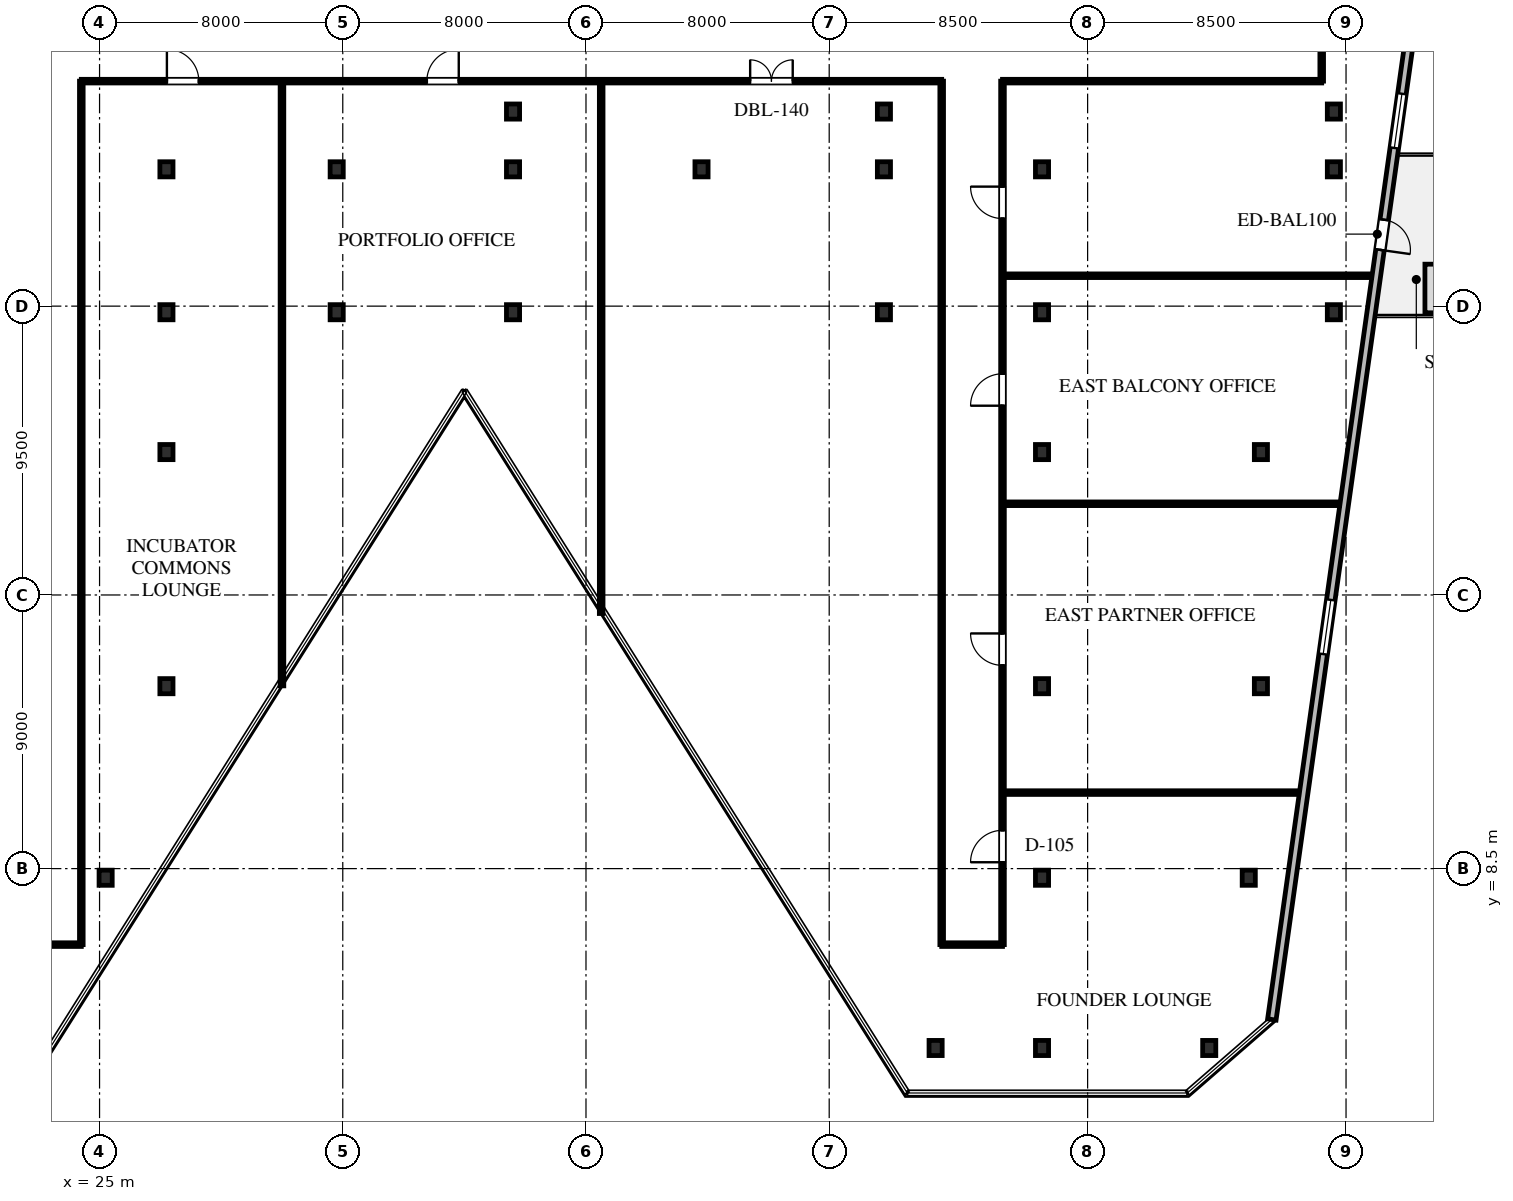
"""IFC4 building model, lengths in metres.
Left out: names, types, materials, properties, quantities, classifications, styles, units other than length and angle.
Written with IfcOpenShell. Run it as: python <this file> out.ifc"""

import sys

from ifc_helpers import new_model, si_unit, direction, frame, frame_2d, origin, origin_2d, place, context, subcontext, project, spatial, rectangle, i_section, extrude, element, fill, save


model = new_model("IFC4")
c1 = context("Model", 3, precision=1e-05, world=origin(), true_north=direction((0.0, 1.0)))
c2 = subcontext(c1, "Body", "Model", "MODEL_VIEW")
j1 = project(units=[si_unit("LENGTHUNIT", "METRE"), si_unit("PLANEANGLEUNIT", "RADIAN")], contexts=[c1])
p1 = place(None, origin())
s1 = spatial("IfcSite", under=j1, at=p1, CompositionType="ELEMENT")
p2 = place(p1, origin())
s2 = spatial("IfcBuilding", under=s1, at=p2, CompositionType="ELEMENT")
p3 = place(p2, frame((0.0, 0.0, 77.5)))
s3 = spatial("IfcBuildingStorey", under=s2, at=p3, CompositionType="ELEMENT", Elevation=77.5)
for number, where, z_axis, x_axis in (
    (1, (56.0, 14.5, 0.0), (0.0, 0.0, 1.0), (1.0, 0.0, 0.0)),
    (2, (63.2, 14.5, 0.0), (0.0, 0.0, 1.0), (1.0, 0.0, 0.0)),
    (3, (27.2, 22.2, 0.0), (0.0, 0.0, 1.0), (1.0, 0.0, 0.0)),
    (4, (56.0, 22.2, 0.0), (0.0, 0.0, 1.0), (1.0, 0.0, 0.0)),
    (5, (63.2, 22.2, 0.0), (0.0, 0.0, 1.0), (1.0, 0.0, 0.0)),
    (6, (27.2, 26.8, 0.0), (0.0, 0.0, 1.0), (1.0, 0.0, 0.0)),
    (7, (32.8, 26.8, 0.0), (0.0, 0.0, 1.0), (1.0, 0.0, 0.0)),
    (8, (38.6, 26.8, 0.0), (0.0, 0.0, 1.0), (1.0, 0.0, 0.0)),
    (9, (50.8, 26.8, 0.0), (0.0, 0.0, 1.0), (1.0, 0.0, 0.0)),
    (10, (56.0, 26.8, 0.0), (0.0, 0.0, 1.0), (1.0, 0.0, 0.0)),
    (11, (65.6, 26.8, 0.0), (0.0, 0.0, 1.0), (1.0, 0.0, 0.0)),
    (12, (27.2, 31.5, 0.0), (0.0, 0.0, 1.0), (1.0, 0.0, 0.0)),
    (13, (32.8, 31.5, 0.0), (0.0, 0.0, 1.0), (1.0, 0.0, 0.0)),
    (14, (38.6, 31.5, 0.0), (0.0, 0.0, 1.0), (1.0, 0.0, 0.0)),
    (15, (44.8, 31.5, 0.0), (0.0, 0.0, 1.0), (1.0, 0.0, 0.0)),
    (16, (50.8, 31.5, 0.0), (0.0, 0.0, 1.0), (1.0, 0.0, 0.0)),
    (17, (56.0, 31.5, 0.0), (0.0, 0.0, 1.0), (1.0, 0.0, 0.0)),
    (18, (65.6, 31.5, 0.0), (0.0, 0.0, 1.0), (1.0, 0.0, 0.0)),
    (19, (52.5, 2.6, 0.0), (0.0, 0.0, 1.0), (1.0, 0.0, 0.0)),
    (20, (56.0, 2.6, 0.0), (0.0, 0.0, 1.0), (1.0, 0.0, 0.0)),
    (21, (61.5, 2.6, 0.0), (0.0, 0.0, 1.0), (1.0, 0.0, 0.0)),
    (22, (25.2, 8.2, 0.0), (0.0, 0.0, 1.0), (1.0, 0.0, 0.0)),
    (23, (56.0, 8.2, 0.0), (0.0, 0.0, 1.0), (1.0, 0.0, 0.0)),
    (24, (62.8, 8.2, 0.0), (0.0, 0.0, 1.0), (1.0, 0.0, 0.0)),
    (25, (27.2, 14.5, 0.0), (0.0, 0.0, 1.0), (1.0, 0.0, 0.0)),
    (26, (38.6, 33.4, 0.0), (0.0, 0.0, 1.0), (1.0, 0.0, 0.0)),
    (27, (50.8, 33.4, 0.0), (0.0, 0.0, 1.0), (1.0, 0.0, 0.0)),
    (28, (65.6, 33.4, 0.0), (0.0, 0.0, 1.0), (1.0, 0.0, 0.0)),
):
    element("IfcColumn", number, at=place(p3, frame(where, z_axis=z_axis, x_axis=x_axis)), inside=s3, PredefinedType="COLUMN", context=c2, shape_type="SweptSolid", body=[
        extrude(i_section(OverallWidth=0.432, OverallDepth=0.498, WebThickness=0.056, FlangeThickness=0.089, FilletRadius=0.03, at=origin_2d()), origin(), (0.0, 0.0, 1.0), 4.0),
    ])
p4 = place(p3, frame((68.375, 37.8, 0.0), z_axis=(0.0, 0.0, 1.0), x_axis=(-0.139174610616, -0.990267856572, 0.0)))
e29 = element("IfcWall", 29, at=p4, inside=s3, PredefinedType="STANDARD", context=c2, shape_type="SweptSolid", body=[
    extrude(rectangle(XDim=34.6, YDim=0.28, at=frame_2d((17.3, 0.0))), origin(), (0.0, 0.0, 1.0), 3.74),
])
p5 = place(p4, frame((8.036, 0.0, 0.0)))
e30 = element("IfcOpeningElement", 30, at=p5, cuts=e29, PredefinedType="OPENING", context=c2, shape_type="SweptSolid", body=[
    extrude(rectangle(XDim=1.0, YDim=2.15, at=frame_2d((0.5, 1.075))), frame((0.0, 0.15, 0.0), z_axis=(0.0, -1.0, 0.0), x_axis=(1.0, 0.0, 0.0)), (0.0, 0.0, 1.0), 0.3),
])
p6 = place(p4, frame((3.852, 0.0, 0.65)))
e31 = element("IfcOpeningElement", 31, at=p6, cuts=e29, PredefinedType="OPENING", context=c2, shape_type="SweptSolid", body=[
    extrude(rectangle(XDim=1.8, YDim=2.1, at=frame_2d((0.9, 1.05))), frame((0.0, 0.15, 0.0), z_axis=(0.0, -1.0, 0.0), x_axis=(1.0, 0.0, 0.0)), (0.0, 0.0, 1.0), 0.3),
])
p7 = place(p4, frame((20.663, 0.0, 0.65)))
e32 = element("IfcOpeningElement", 32, at=p7, cuts=e29, PredefinedType="OPENING", context=c2, shape_type="SweptSolid", body=[
    extrude(rectangle(XDim=1.8, YDim=2.1, at=frame_2d((0.9, 1.05))), frame((0.0, 0.15, 0.0), z_axis=(0.0, -1.0, 0.0), x_axis=(1.0, 0.0, 0.0)), (0.0, 0.0, 1.0), 0.3),
])
p8 = place(p3, frame((24.4, 34.4, 0.0), z_axis=(0.0, 0.0, 1.0), x_axis=(1.0, 0.0, 0.0)))
e33 = element("IfcWall", 33, at=p8, inside=s3, PredefinedType="PARTITIONING", context=c2, shape_type="SweptSolid", body=[
    extrude(rectangle(XDim=28.3, YDim=0.12, at=frame_2d((14.15, 0.0))), origin(), (0.0, 0.0, 1.0), 2.813),
])
p9 = place(p8, frame((2.815, 0.0, 0.0)))
e34 = element("IfcOpeningElement", 34, at=p9, cuts=e33, PredefinedType="OPENING", context=c2, shape_type="SweptSolid", body=[
    extrude(rectangle(XDim=1.05, YDim=2.2, at=frame_2d((0.525, 1.1))), frame((0.0, 0.07, 0.0), z_axis=(0.0, -1.0, 0.0), x_axis=(1.0, 0.0, 0.0)), (0.0, 0.0, 1.0), 0.14),
])
p10 = place(p8, frame((11.365, 0.0, 0.0)))
e35 = element("IfcOpeningElement", 35, at=p10, cuts=e33, PredefinedType="OPENING", context=c2, shape_type="SweptSolid", body=[
    extrude(rectangle(XDim=1.05, YDim=2.2, at=frame_2d((0.525, 1.1))), frame((0.0, 0.07, 0.0), z_axis=(0.0, -1.0, 0.0), x_axis=(1.0, 0.0, 0.0)), (0.0, 0.0, 1.0), 0.14),
])
p11 = place(p8, frame((22.0, 0.0, 0.0)))
e36 = element("IfcOpeningElement", 36, at=p11, cuts=e33, PredefinedType="OPENING", context=c2, shape_type="SweptSolid", body=[
    extrude(rectangle(XDim=1.4, YDim=2.2, at=frame_2d((0.7, 1.1))), frame((0.0, 0.07, 0.0), z_axis=(0.0, -1.0, 0.0), x_axis=(1.0, 0.0, 0.0)), (0.0, 0.0, 1.0), 0.14),
])
p12 = place(p3, frame((54.7, 34.4, 0.0), z_axis=(0.0, 0.0, 1.0), x_axis=(1.0, 0.0, 0.0)))
e37 = element("IfcWall", 37, at=p12, inside=s3, PredefinedType="PARTITIONING", context=c2, shape_type="SweptSolid", body=[
    extrude(rectangle(XDim=10.5, YDim=0.12, at=frame_2d((5.25, 0.0))), origin(), (0.0, 0.0, 1.0), 2.813),
])
p13 = place(p3, frame((65.2, 34.4, 0.0), z_axis=(0.0, 0.0, 1.0), x_axis=(0.0, 1.0, 0.0)))
e38 = element("IfcWall", 38, at=p13, inside=s3, PredefinedType="PARTITIONING", context=c2, shape_type="SweptSolid", body=[
    extrude(rectangle(XDim=3.217, YDim=0.12, at=frame_2d((1.608, 0.0))), origin(), (0.0, 0.0, 1.0), 2.813),
])
p14 = place(p3, frame((24.4, 6.0, 0.0), z_axis=(0.0, 0.0, 1.0), x_axis=(0.0, 1.0, 0.0)))
e39 = element("IfcWall", 39, at=p14, inside=s3, PredefinedType="PARTITIONING", context=c2, shape_type="SweptSolid", body=[
    extrude(rectangle(XDim=28.4, YDim=0.12, at=frame_2d((14.2, 0.0))), origin(), (0.0, 0.0, 1.0), 2.813),
])
p15 = place(p3, frame((22.4, 6.0, 0.0), z_axis=(0.0, 0.0, 1.0), x_axis=(1.0, 0.0, 0.0)))
e40 = element("IfcWall", 40, at=p15, inside=s3, PredefinedType="PARTITIONING", context=c2, shape_type="SweptSolid", body=[
    extrude(rectangle(XDim=2.0, YDim=0.12, at=frame_2d((1.0, 0.0))), origin(), (0.0, 0.0, 1.0), 2.978),
])
p16 = place(p3, frame((52.7, 6.0, 0.0), z_axis=(0.0, 0.0, 1.0), x_axis=(0.0, 1.0, 0.0)))
e41 = element("IfcWall", 41, at=p16, inside=s3, PredefinedType="PARTITIONING", context=c2, shape_type="SweptSolid", body=[
    extrude(rectangle(XDim=28.4, YDim=0.12, at=frame_2d((14.2, 0.0))), origin(), (0.0, 0.0, 1.0), 2.813),
])
p17 = place(p3, frame((54.7, 6.0, 0.0), z_axis=(0.0, 0.0, 1.0), x_axis=(0.0, 1.0, 0.0)))
e42 = element("IfcWall", 42, at=p17, inside=s3, PredefinedType="PARTITIONING", context=c2, shape_type="SweptSolid", body=[
    extrude(rectangle(XDim=28.4, YDim=0.12, at=frame_2d((14.2, 0.0))), origin(), (0.0, 0.0, 1.0), 2.813),
])
p18 = place(p17, frame((2.709, 0.0, 0.0)))
e43 = element("IfcOpeningElement", 43, at=p18, cuts=e42, PredefinedType="OPENING", context=c2, shape_type="SweptSolid", body=[
    extrude(rectangle(XDim=1.05, YDim=2.2, at=frame_2d((0.525, 1.1))), frame((0.0, 0.07, 0.0), z_axis=(0.0, -1.0, 0.0), x_axis=(1.0, 0.0, 0.0)), (0.0, 0.0, 1.0), 0.14),
])
p19 = place(p17, frame((9.185, 0.0, 0.0)))
e44 = element("IfcOpeningElement", 44, at=p19, cuts=e42, PredefinedType="OPENING", context=c2, shape_type="SweptSolid", body=[
    extrude(rectangle(XDim=1.05, YDim=2.2, at=frame_2d((0.525, 1.1))), frame((0.0, 0.07, 0.0), z_axis=(0.0, -1.0, 0.0), x_axis=(1.0, 0.0, 0.0)), (0.0, 0.0, 1.0), 0.14),
])
p20 = place(p17, frame((17.725, 0.0, 0.0)))
e45 = element("IfcOpeningElement", 45, at=p20, cuts=e42, PredefinedType="OPENING", context=c2, shape_type="SweptSolid", body=[
    extrude(rectangle(XDim=1.05, YDim=2.2, at=frame_2d((0.525, 1.1))), frame((0.0, 0.07, 0.0), z_axis=(0.0, -1.0, 0.0), x_axis=(1.0, 0.0, 0.0)), (0.0, 0.0, 1.0), 0.14),
])
p21 = place(p17, frame((23.881, 0.0, 0.0)))
e46 = element("IfcOpeningElement", 46, at=p21, cuts=e42, PredefinedType="OPENING", context=c2, shape_type="SweptSolid", body=[
    extrude(rectangle(XDim=1.05, YDim=2.2, at=frame_2d((0.525, 1.1))), frame((0.0, 0.07, 0.0), z_axis=(0.0, -1.0, 0.0), x_axis=(1.0, 0.0, 0.0)), (0.0, 0.0, 1.0), 0.14),
])
p22 = place(p3, frame((52.7, 6.0, 0.0), z_axis=(0.0, 0.0, 1.0), x_axis=(1.0, 0.0, 0.0)))
e47 = element("IfcWall", 47, at=p22, inside=s3, PredefinedType="PARTITIONING", context=c2, shape_type="SweptSolid", body=[
    extrude(rectangle(XDim=2.0, YDim=0.12, at=frame_2d((1.0, 0.0))), origin(), (0.0, 0.0, 1.0), 2.978),
])
p23 = place(p3, frame((54.768, 11.0, 0.0), z_axis=(0.0, 0.0, 1.0), x_axis=(1.0, 0.0, 0.0)))
e48 = element("IfcWall", 48, at=p23, inside=s3, PredefinedType="PARTITIONING", context=c2, shape_type="SweptSolid", body=[
    extrude(rectangle(XDim=9.674, YDim=0.12, at=frame_2d((4.837, 0.0))), origin(), (0.0, 0.0, 1.0), 2.813),
])
p24 = place(p3, frame((54.768, 20.5, 0.0), z_axis=(0.0, 0.0, 1.0), x_axis=(1.0, 0.0, 0.0)))
e49 = element("IfcWall", 49, at=p24, inside=s3, PredefinedType="PARTITIONING", context=c2, shape_type="SweptSolid", body=[
    extrude(rectangle(XDim=11.009, YDim=0.12, at=frame_2d((5.504, 0.0))), origin(), (0.0, 0.0, 1.0), 2.813),
])
p25 = place(p3, frame((54.768, 28.0, 0.0), z_axis=(0.0, 0.0, 1.0), x_axis=(1.0, 0.0, 0.0)))
e50 = element("IfcWall", 50, at=p25, inside=s3, PredefinedType="PARTITIONING", context=c2, shape_type="SweptSolid", body=[
    extrude(rectangle(XDim=12.063, YDim=0.12, at=frame_2d((6.031, 0.0))), origin(), (0.0, 0.0, 1.0), 2.813),
])
p26 = place(p3, frame((31.0, 14.511, 0.0), z_axis=(0.0, 0.0, 1.0), x_axis=(0.0, 1.0, 0.0)))
e51 = element("IfcWall", 51, at=p26, inside=s3, PredefinedType="PARTITIONING", context=c2, shape_type="SweptSolid", body=[
    extrude(rectangle(XDim=19.821, YDim=0.12, at=frame_2d((9.911, 0.0))), origin(), (0.0, 0.0, 1.0), 2.813),
])
p27 = place(p3, frame((41.5, 16.89, 0.0), z_axis=(0.0, 0.0, 1.0), x_axis=(0.0, 1.0, 0.0)))
e52 = element("IfcWall", 52, at=p27, inside=s3, PredefinedType="PARTITIONING", context=c2, shape_type="SweptSolid", body=[
    extrude(rectangle(XDim=17.442, YDim=0.12, at=frame_2d((8.721, 0.0))), origin(), (0.0, 0.0, 1.0), 2.813),
])
p28 = place(p5, origin())
e53 = element("IfcDoor", 53, at=p28, inside=s3, OperationType="SINGLE_SWING_RIGHT", PredefinedType="DOOR", context=c2, shape_type="SweptSolid", body=[
    extrude(rectangle(XDim=1.0, YDim=2.15, at=frame_2d((0.5, 1.075))), frame((0.0, 0.025, 0.0), z_axis=(0.0, -1.0, 0.0), x_axis=(1.0, 0.0, 0.0)), (0.0, 0.0, 1.0), 0.05),
])
fill(e30, e53)
p29 = place(p6, origin())
e54 = element("IfcWindow", 54, at=p29, inside=s3, PartitioningType="SINGLE_PANEL", PredefinedType="WINDOW", context=c2, shape_type="SweptSolid", body=[
    extrude(rectangle(XDim=1.8, YDim=2.1, at=frame_2d((0.9, 1.05))), frame((0.0, 0.03, 0.0), z_axis=(0.0, -1.0, 0.0), x_axis=(1.0, 0.0, 0.0)), (0.0, 0.0, 1.0), 0.06),
])
fill(e31, e54)
p30 = place(p7, origin())
e55 = element("IfcWindow", 55, at=p30, inside=s3, PartitioningType="SINGLE_PANEL", PredefinedType="WINDOW", context=c2, shape_type="SweptSolid", body=[
    extrude(rectangle(XDim=1.8, YDim=2.1, at=frame_2d((0.9, 1.05))), frame((0.0, 0.03, 0.0), z_axis=(0.0, -1.0, 0.0), x_axis=(1.0, 0.0, 0.0)), (0.0, 0.0, 1.0), 0.06),
])
fill(e32, e55)
p31 = place(p18, origin())
e56 = element("IfcDoor", 56, at=p31, inside=s3, OperationType="SINGLE_SWING_LEFT", PredefinedType="DOOR", context=c2, shape_type="SweptSolid", body=[
    extrude(rectangle(XDim=1.05, YDim=2.2, at=frame_2d((0.525, 1.1))), frame((0.0, 0.025, 0.0), z_axis=(0.0, -1.0, 0.0), x_axis=(1.0, 0.0, 0.0)), (0.0, 0.0, 1.0), 0.05),
])
fill(e43, e56)
p32 = place(p19, origin())
e57 = element("IfcDoor", 57, at=p32, inside=s3, OperationType="SINGLE_SWING_RIGHT", PredefinedType="DOOR", context=c2, shape_type="SweptSolid", body=[
    extrude(rectangle(XDim=1.05, YDim=2.2, at=frame_2d((0.525, 1.1))), frame((0.0, 0.025, 0.0), z_axis=(0.0, -1.0, 0.0), x_axis=(1.0, 0.0, 0.0)), (0.0, 0.0, 1.0), 0.05),
])
fill(e44, e57)
p33 = place(p20, origin())
e58 = element("IfcDoor", 58, at=p33, inside=s3, OperationType="SINGLE_SWING_LEFT", PredefinedType="DOOR", context=c2, shape_type="SweptSolid", body=[
    extrude(rectangle(XDim=1.05, YDim=2.2, at=frame_2d((0.525, 1.1))), frame((0.0, 0.025, 0.0), z_axis=(0.0, -1.0, 0.0), x_axis=(1.0, 0.0, 0.0)), (0.0, 0.0, 1.0), 0.05),
])
fill(e45, e58)
p34 = place(p21, origin())
e59 = element("IfcDoor", 59, at=p34, inside=s3, OperationType="SINGLE_SWING_RIGHT", PredefinedType="DOOR", context=c2, shape_type="SweptSolid", body=[
    extrude(rectangle(XDim=1.05, YDim=2.2, at=frame_2d((0.525, 1.1))), frame((0.0, 0.025, 0.0), z_axis=(0.0, -1.0, 0.0), x_axis=(1.0, 0.0, 0.0)), (0.0, 0.0, 1.0), 0.05),
])
fill(e46, e59)
p35 = place(p9, origin())
e60 = element("IfcDoor", 60, at=p35, inside=s3, OperationType="SINGLE_SWING_LEFT", PredefinedType="DOOR", context=c2, shape_type="SweptSolid", body=[
    extrude(rectangle(XDim=1.05, YDim=2.2, at=frame_2d((0.525, 1.1))), frame((0.0, 0.025, 0.0), z_axis=(0.0, -1.0, 0.0), x_axis=(1.0, 0.0, 0.0)), (0.0, 0.0, 1.0), 0.05),
])
fill(e34, e60)
p36 = place(p10, origin())
e61 = element("IfcDoor", 61, at=p36, inside=s3, OperationType="SINGLE_SWING_RIGHT", PredefinedType="DOOR", context=c2, shape_type="SweptSolid", body=[
    extrude(rectangle(XDim=1.05, YDim=2.2, at=frame_2d((0.525, 1.1))), frame((0.0, 0.025, 0.0), z_axis=(0.0, -1.0, 0.0), x_axis=(1.0, 0.0, 0.0)), (0.0, 0.0, 1.0), 0.05),
])
fill(e35, e61)
p37 = place(p11, origin())
e62 = element("IfcDoor", 62, at=p37, inside=s3, OperationType="DOUBLE_DOOR_SINGLE_SWING", PredefinedType="DOOR", context=c2, shape_type="SweptSolid", body=[
    extrude(rectangle(XDim=1.4, YDim=2.2, at=frame_2d((0.7, 1.1))), frame((0.0, 0.025, 0.0), z_axis=(0.0, -1.0, 0.0), x_axis=(1.0, 0.0, 0.0)), (0.0, 0.0, 1.0), 0.05),
])
fill(e36, e62)
save(model, sys.argv[1])
